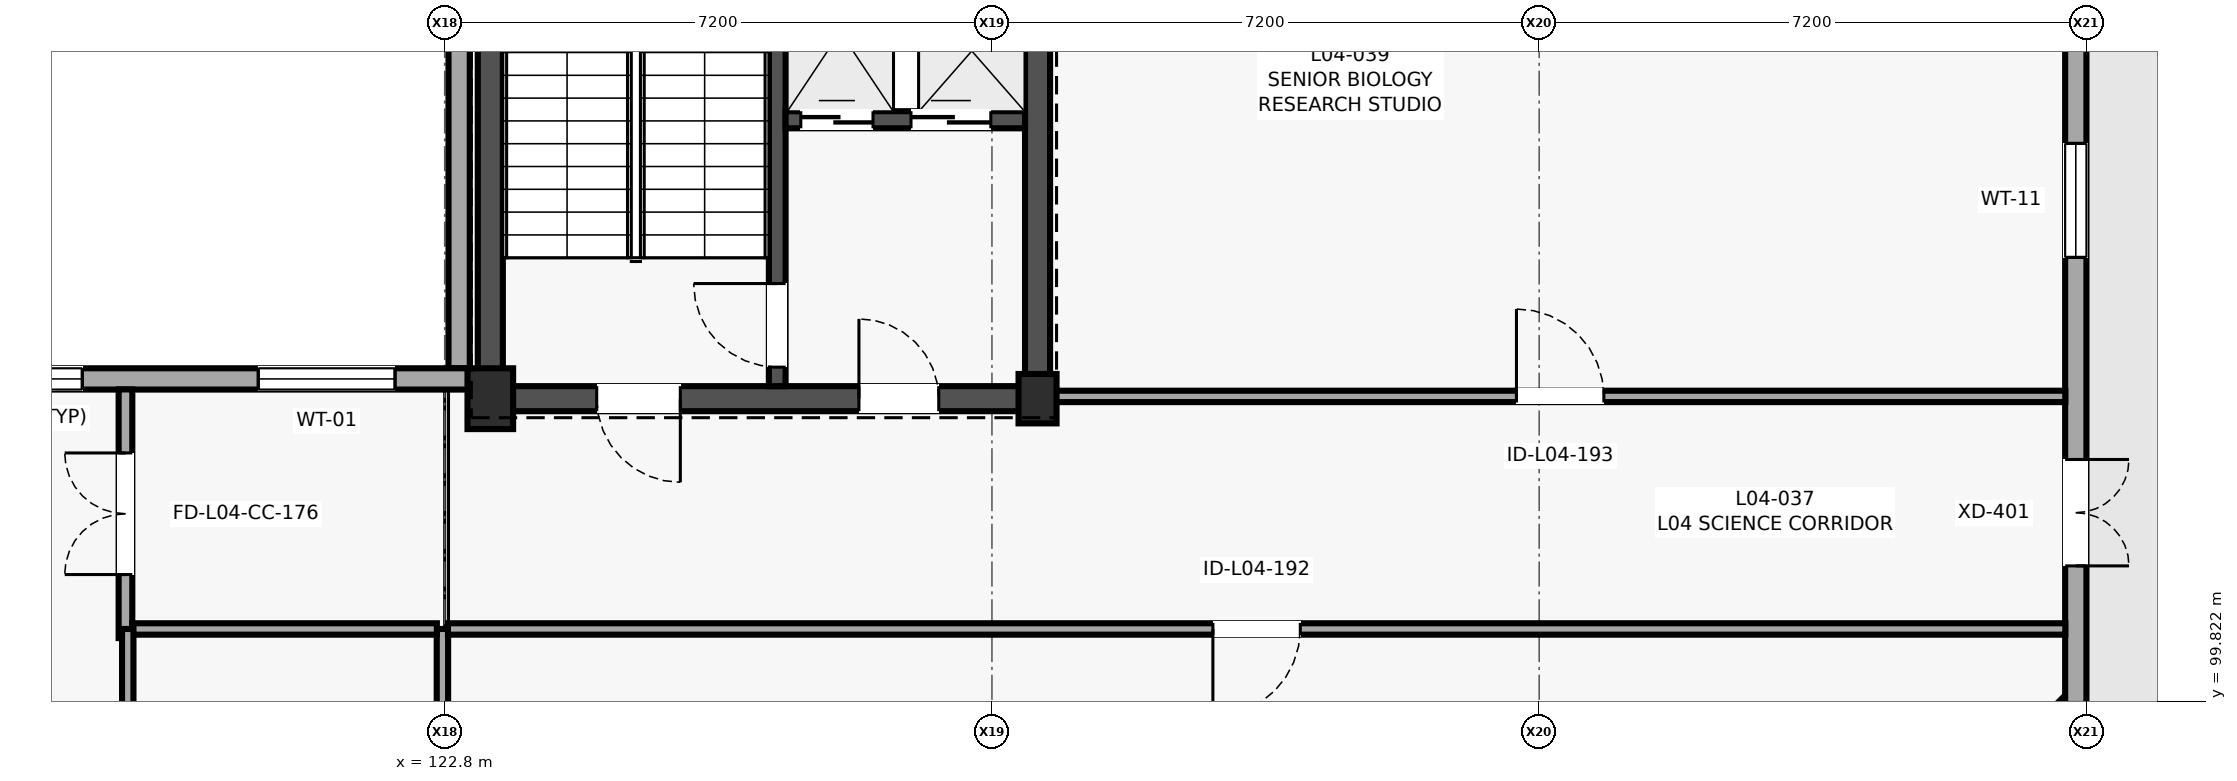
"""IFC4 building model, lengths in metres.
Left out: names, types, materials, properties, quantities, classifications, styles, units other than length and angle.
Written with IfcOpenShell. Run it as: python <this file> out.ifc"""

import sys

from ifc_helpers import new_model, si_unit, direction, frame, frame_2d, origin, origin_2d, place, context, subcontext, project, spatial, rectangle, extrude, element, fill, save


model = new_model("IFC4")
c1 = context("Model", 3, precision=1e-05, world=origin(), true_north=direction((0.0, 1.0)))
c2 = subcontext(c1, "Body", "Model", "MODEL_VIEW")
j1 = project(units=[si_unit("LENGTHUNIT", "METRE"), si_unit("PLANEANGLEUNIT", "RADIAN")], contexts=[c1])
p1 = place(None, origin())
s1 = spatial("IfcSite", under=j1, at=p1, CompositionType="ELEMENT")
p2 = place(p1, origin())
s2 = spatial("IfcBuilding", under=s1, at=p2, CompositionType="ELEMENT")
p3 = place(p2, frame((0.0, 0.0, 16.2)))
s3 = spatial("IfcBuildingStorey", under=s2, at=p3, CompositionType="ELEMENT", Elevation=16.2)
p4 = place(p3, frame((123.4, 103.8, 0.0), z_axis=(0.0, 0.0, 1.0), x_axis=(1.0, 0.0, 0.0)))
e1 = element("IfcColumn", 1, at=p4, inside=s3, PredefinedType="COLUMN", context=c2, shape_type="SweptSolid", body=[
    extrude(rectangle(XDim=0.6, YDim=0.8, at=origin_2d()), origin(), (0.0, 0.0, 1.0), 4.0),
])
p5 = place(p3, frame((130.6, 103.8, 0.0), z_axis=(0.0, 0.0, 1.0), x_axis=(1.0, 0.0, 0.0)))
e2 = element("IfcColumn", 2, at=p5, inside=s3, PredefinedType="COLUMN", context=c2, shape_type="SweptSolid", body=[
    extrude(rectangle(XDim=0.5, YDim=0.65, at=origin_2d()), origin(), (0.0, 0.0, 1.0), 4.0),
])
p6 = place(p3, frame((141.005, 96.584, 0.0), z_axis=(0.0, 0.0, 1.0), x_axis=(0.707133661755, 0.707079899597, 0.0)))
e3 = element("IfcWall", 3, at=p6, inside=s3, PredefinedType="SOLIDWALL", context=c2, shape_type="SweptSolid", body=[
    extrude(rectangle(XDim=4.541, YDim=0.28, at=frame_2d((2.271, 0.0))), origin(), (0.0, 0.0, 1.0), 3.78),
])
p7 = place(p3, frame((144.26, 99.783, 0.0), z_axis=(0.0, 0.0, 1.0), x_axis=(0.0, 1.0, 0.0)))
e4 = element("IfcWall", 4, at=p7, inside=s3, PredefinedType="SOLIDWALL", context=c2, shape_type="SweptSolid", body=[
    extrude(rectangle(XDim=8.834, YDim=0.28, at=frame_2d((4.417, 0.0))), origin(), (0.0, 0.0, 1.0), 3.78),
])
p8 = place(p7, frame((1.817, 0.0, 0.0)))
e5 = element("IfcOpeningElement", 5, at=p8, cuts=e4, PredefinedType="OPENING", context=c2, shape_type="SweptSolid", body=[
    extrude(rectangle(XDim=1.4, YDim=2.15, at=frame_2d((0.7, 1.075))), frame((0.0, 0.15, 0.0), z_axis=(0.0, -1.0, 0.0), x_axis=(1.0, 0.0, 0.0)), (0.0, 0.0, 1.0), 0.3),
])
p9 = place(p7, frame((5.876, 0.0, 0.75)))
e6 = element("IfcOpeningElement", 6, at=p9, cuts=e4, PredefinedType="OPENING", context=c2, shape_type="SweptSolid", body=[
    extrude(rectangle(XDim=1.5, YDim=2.2, at=frame_2d((0.75, 1.1))), frame((0.0, 0.15, 0.0), z_axis=(0.0, -1.0, 0.0), x_axis=(1.0, 0.0, 0.0)), (0.0, 0.0, 1.0), 0.3),
])
p10 = place(p3, frame((122.99, 111.72, 0.0), z_axis=(0.0, 0.0, 1.0), x_axis=(0.0, -1.0, 0.0)))
e7 = element("IfcWall", 7, at=p10, inside=s3, PredefinedType="SOLIDWALL", context=c2, shape_type="SweptSolid", body=[
    extrude(rectangle(XDim=7.52, YDim=0.28, at=frame_2d((3.76, 0.0))), origin(), (0.0, 0.0, 1.0), 3.78),
])
p11 = place(p3, frame((123.13, 104.06, 0.0), z_axis=(0.0, 0.0, 1.0), x_axis=(-1.0, 0.0, 0.0)))
e8 = element("IfcWall", 8, at=p11, inside=s3, PredefinedType="SOLIDWALL", context=c2, shape_type="SweptSolid", body=[
    extrude(rectangle(XDim=7.53, YDim=0.28, at=frame_2d((3.765, 0.0))), origin(), (0.0, 0.0, 1.0), 3.78),
])
p12 = place(p11, frame((0.983, 0.0, 0.85)))
e9 = element("IfcOpeningElement", 9, at=p12, cuts=e8, PredefinedType="OPENING", context=c2, shape_type="SweptSolid", body=[
    extrude(rectangle(XDim=1.8, YDim=1.8, at=frame_2d((0.9, 0.9))), frame((0.0, 0.15, 0.0), z_axis=(0.0, -1.0, 0.0), x_axis=(1.0, 0.0, 0.0)), (0.0, 0.0, 1.0), 0.3),
])
p13 = place(p11, frame((5.098, 0.0, 0.75)))
e10 = element("IfcOpeningElement", 10, at=p13, cuts=e8, PredefinedType="OPENING", context=c2, shape_type="SweptSolid", body=[
    extrude(rectangle(XDim=1.1, YDim=2.1, at=frame_2d((0.55, 1.05))), frame((0.0, 0.15, 0.0), z_axis=(0.0, -1.0, 0.0), x_axis=(1.0, 0.0, 0.0)), (0.0, 0.0, 1.0), 0.3),
])
p14 = place(p3, frame((123.235, 103.8, 0.0), z_axis=(0.0, 0.0, 1.0), x_axis=(1.0, 0.0, 0.0)))
e11 = element("IfcWall", 11, at=p14, inside=s3, PredefinedType="SHEAR", context=c2, shape_type="SweptSolid", body=[
    extrude(rectangle(XDim=7.53, YDim=0.33, at=frame_2d((3.765, 0.0))), origin(), (0.0, 0.0, 1.0), 3.78),
])
p15 = place(p14, frame((5.015, 0.0, 0.0)))
e12 = element("IfcOpeningElement", 12, at=p15, cuts=e11, PredefinedType="OPENING", context=c2, shape_type="SweptSolid", body=[
    extrude(rectangle(XDim=1.05, YDim=2.15, at=frame_2d((0.525, 1.075))), frame((0.0, 0.175, 0.0), z_axis=(0.0, -1.0, 0.0), x_axis=(1.0, 0.0, 0.0)), (0.0, 0.0, 1.0), 0.35),
])
p16 = place(p14, frame((1.565, 0.0, 0.0)))
e13 = element("IfcOpeningElement", 13, at=p16, cuts=e11, PredefinedType="OPENING", context=c2, shape_type="SweptSolid", body=[
    extrude(rectangle(XDim=1.1, YDim=2.15, at=frame_2d((0.55, 1.075))), frame((0.0, 0.175, 0.0), z_axis=(0.0, -1.0, 0.0), x_axis=(1.0, 0.0, 0.0)), (0.0, 0.0, 1.0), 0.35),
])
for number, where, z_axis, x_axis in (
    (14, (123.4, 103.965, 0.0), (0.0, 0.0, 1.0), (0.0, 1.0, 0.0)),
    (15, (130.6, 103.965, 0.0), (0.0, 0.0, 1.0), (0.0, 1.0, 0.0)),
):
    element("IfcWall", number, at=place(p3, frame(where, z_axis=z_axis, x_axis=x_axis)), inside=s3, PredefinedType="SHEAR", context=c2, shape_type="SweptSolid", body=[
        extrude(rectangle(XDim=7.47, YDim=0.33, at=frame_2d((3.735, 0.0))), origin(), (0.0, 0.0, 1.0), 3.78),
    ])
p17 = place(p3, frame((127.175, 103.965, 0.0), z_axis=(0.0, 0.0, 1.0), x_axis=(0.0, 1.0, 0.0)))
e16 = element("IfcWall", 16, at=p17, inside=s3, PredefinedType="SHEAR", context=c2, shape_type="SweptSolid", body=[
    extrude(rectangle(XDim=7.47, YDim=0.22, at=frame_2d((3.735, 0.0))), origin(), (0.0, 0.0, 1.0), 3.78),
])
p18 = place(p17, frame((0.25, 0.0, 0.0)))
e17 = element("IfcOpeningElement", 17, at=p18, cuts=e16, PredefinedType="OPENING", context=c2, shape_type="SweptSolid", body=[
    extrude(rectangle(XDim=1.1, YDim=2.15, at=frame_2d((0.55, 1.075))), frame((0.0, 0.12, 0.0), z_axis=(0.0, -1.0, 0.0), x_axis=(1.0, 0.0, 0.0)), (0.0, 0.0, 1.0), 0.24),
])
p19 = place(p3, frame((127.285, 107.47, 0.0), z_axis=(0.0, 0.0, 1.0), x_axis=(1.0, 0.0, 0.0)))
e18 = element("IfcWall", 18, at=p19, inside=s3, PredefinedType="SHEAR", context=c2, shape_type="SweptSolid", body=[
    extrude(rectangle(XDim=3.15, YDim=0.225, at=frame_2d((1.575, 0.0))), origin(), (0.0, 0.0, 1.0), 3.78),
])
p20 = place(p19, frame((0.2, 0.0, 0.0)))
e19 = element("IfcOpeningElement", 19, at=p20, cuts=e18, PredefinedType="OPENING", context=c2, shape_type="SweptSolid", body=[
    extrude(rectangle(XDim=0.95, YDim=2.15, at=frame_2d((0.475, 1.075))), frame((0.0, 0.123, 0.0), z_axis=(0.0, -1.0, 0.0), x_axis=(1.0, 0.0, 0.0)), (0.0, 0.0, 1.0), 0.245),
])
p21 = place(p19, frame((1.65, 0.0, 0.0)))
e20 = element("IfcOpeningElement", 20, at=p21, cuts=e18, PredefinedType="OPENING", context=c2, shape_type="SweptSolid", body=[
    extrude(rectangle(XDim=1.05, YDim=2.2, at=frame_2d((0.525, 1.1))), frame((0.0, 0.123, 0.0), z_axis=(0.0, -1.0, 0.0), x_axis=(1.0, 0.0, 0.0)), (0.0, 0.0, 1.0), 0.245),
])
p22 = place(p3, frame((118.6, 100.65, 0.0), z_axis=(0.0, 0.0, 1.0), x_axis=(0.0, 1.0, 0.0)))
e21 = element("IfcWall", 21, at=p22, inside=s3, PredefinedType="PARTITIONING", context=c2, shape_type="SweptSolid", body=[
    extrude(rectangle(XDim=3.272, YDim=0.18, at=frame_2d((1.636, 0.0))), origin(), (0.0, 0.0, 1.0), 3.78),
])
p23 = place(p22, frame((0.836, 0.0, 0.0)))
e22 = element("IfcOpeningElement", 22, at=p23, cuts=e21, PredefinedType="OPENING", context=c2, shape_type="SweptSolid", body=[
    extrude(rectangle(XDim=1.6, YDim=2.25, at=frame_2d((0.8, 1.125))), frame((0.0, 0.1, 0.0), z_axis=(0.0, -1.0, 0.0), x_axis=(1.0, 0.0, 0.0)), (0.0, 0.0, 1.0), 0.2),
])
p24 = place(p3, frame((122.77, 96.678, 0.0), z_axis=(0.0, 0.0, 1.0), x_axis=(0.0, 1.0, 0.0)))
e23 = element("IfcWall", 23, at=p24, inside=s3, PredefinedType="PARTITIONING", context=c2, shape_type="SweptSolid", body=[
    extrude(rectangle(XDim=4.092, YDim=0.15, at=frame_2d((2.046, 0.0))), origin(), (0.0, 0.0, 1.0), 3.775),
])
p25 = place(p3, frame((122.697, 100.77, 0.0), z_axis=(0.0, 0.0, 1.0), x_axis=(-1.0, 0.0, 0.0)))
e24 = element("IfcWall", 24, at=p25, inside=s3, PredefinedType="PARTITIONING", context=c2, shape_type="SweptSolid", body=[
    extrude(rectangle(XDim=4.009, YDim=0.15, at=frame_2d((2.004, 0.0))), origin(), (0.0, 0.0, 1.0), 3.775),
])
p26 = place(p3, frame((118.63, 100.77, 0.0), z_axis=(0.0, 0.0, 1.0), x_axis=(0.0, -1.0, 0.0)))
e25 = element("IfcWall", 25, at=p26, inside=s3, PredefinedType="PARTITIONING", context=c2, shape_type="SweptSolid", body=[
    extrude(rectangle(XDim=10.922, YDim=0.15, at=frame_2d((5.461, 0.0))), origin(), (0.0, 0.0, 1.0), 3.225),
])
p27 = place(p26, frame((4.886, 0.0, 0.0)))
e26 = element("IfcOpeningElement", 26, at=p27, cuts=e25, PredefinedType="OPENING", context=c2, shape_type="SweptSolid", body=[
    extrude(rectangle(XDim=1.15, YDim=2.2, at=frame_2d((0.575, 1.1))), frame((0.0, 0.085, 0.0), z_axis=(0.0, -1.0, 0.0), x_axis=(1.0, 0.0, 0.0)), (0.0, 0.0, 1.0), 0.17),
])
p28 = place(p3, frame((144.122, 100.77, 0.0), z_axis=(0.0, 0.0, 1.0), x_axis=(-1.0, 0.0, 0.0)))
e27 = element("IfcWall", 27, at=p28, inside=s3, PredefinedType="PARTITIONING", context=c2, shape_type="SweptSolid", body=[
    extrude(rectangle(XDim=21.279, YDim=0.15, at=frame_2d((10.64, 0.0))), origin(), (0.0, 0.0, 1.0), 3.76),
])
p29 = place(p28, frame((10.065, 0.0, 0.0)))
e28 = element("IfcOpeningElement", 28, at=p29, cuts=e27, PredefinedType="OPENING", context=c2, shape_type="SweptSolid", body=[
    extrude(rectangle(XDim=1.15, YDim=2.2, at=frame_2d((0.575, 1.1))), frame((0.0, 0.085, 0.0), z_axis=(0.0, -1.0, 0.0), x_axis=(1.0, 0.0, 0.0)), (0.0, 0.0, 1.0), 0.17),
])
p30 = place(p3, frame((130.83, 103.83, 0.0), z_axis=(0.0, 0.0, 1.0), x_axis=(1.0, 0.0, 0.0)))
e29 = element("IfcWall", 29, at=p30, inside=s3, PredefinedType="PARTITIONING", context=c2, shape_type="SweptSolid", body=[
    extrude(rectangle(XDim=13.292, YDim=0.15, at=frame_2d((6.646, 0.0))), origin(), (0.0, 0.0, 1.0), 3.76),
])
p31 = place(p30, frame((6.071, 0.0, 0.0)))
e30 = element("IfcOpeningElement", 30, at=p31, cuts=e29, PredefinedType="OPENING", context=c2, shape_type="SweptSolid", body=[
    extrude(rectangle(XDim=1.15, YDim=2.2, at=frame_2d((0.575, 1.1))), frame((0.0, 0.085, 0.0), z_axis=(0.0, -1.0, 0.0), x_axis=(1.0, 0.0, 0.0)), (0.0, 0.0, 1.0), 0.17),
])
p32 = place(p8, frame((1.4, 0.0, 0.0), z_axis=(0.0, 0.0, 1.0), x_axis=(-1.0, 0.0, 0.0)))
e31 = element("IfcDoor", 31, at=p32, inside=s3, OperationType="DOUBLE_DOOR_SINGLE_SWING", PredefinedType="DOOR", context=c2, shape_type="SweptSolid", body=[
    extrude(rectangle(XDim=1.4, YDim=2.15, at=frame_2d((0.7, 1.075))), frame((0.0, 0.025, 0.0), z_axis=(0.0, -1.0, 0.0), x_axis=(1.0, 0.0, 0.0)), (0.0, 0.0, 1.0), 0.05),
])
fill(e5, e31)
p33 = place(p9, origin())
e32 = element("IfcWindow", 32, at=p33, inside=s3, PartitioningType="SINGLE_PANEL", PredefinedType="WINDOW", context=c2, shape_type="SweptSolid", body=[
    extrude(rectangle(XDim=1.5, YDim=2.2, at=frame_2d((0.75, 1.1))), frame((0.0, 0.03, 0.0), z_axis=(0.0, -1.0, 0.0), x_axis=(1.0, 0.0, 0.0)), (0.0, 0.0, 1.0), 0.06),
])
fill(e6, e32)
p34 = place(p12, origin())
e33 = element("IfcWindow", 33, at=p34, inside=s3, PartitioningType="SINGLE_PANEL", PredefinedType="WINDOW", context=c2, shape_type="SweptSolid", body=[
    extrude(rectangle(XDim=1.8, YDim=1.8, at=frame_2d((0.9, 0.9))), frame((0.0, 0.03, 0.0), z_axis=(0.0, -1.0, 0.0), x_axis=(1.0, 0.0, 0.0)), (0.0, 0.0, 1.0), 0.06),
])
fill(e9, e33)
p35 = place(p13, origin())
e34 = element("IfcWindow", 34, at=p35, inside=s3, PartitioningType="SINGLE_PANEL", PredefinedType="WINDOW", context=c2, shape_type="SweptSolid", body=[
    extrude(rectangle(XDim=1.1, YDim=2.1, at=frame_2d((0.55, 1.05))), frame((0.0, 0.03, 0.0), z_axis=(0.0, -1.0, 0.0), x_axis=(1.0, 0.0, 0.0)), (0.0, 0.0, 1.0), 0.06),
])
fill(e10, e34)
p36 = place(p20, origin())
e35 = element("IfcDoor", 35, at=p36, inside=s3, OperationType="SLIDING_TO_LEFT", PredefinedType="DOOR", context=c2, shape_type="SweptSolid", body=[
    extrude(rectangle(XDim=0.95, YDim=2.15, at=frame_2d((0.475, 1.075))), frame((0.0, 0.025, 0.0), z_axis=(0.0, -1.0, 0.0), x_axis=(1.0, 0.0, 0.0)), (0.0, 0.0, 1.0), 0.05),
])
fill(e19, e35)
p37 = place(p21, origin())
e36 = element("IfcDoor", 36, at=p37, inside=s3, OperationType="SLIDING_TO_RIGHT", PredefinedType="DOOR", context=c2, shape_type="SweptSolid", body=[
    extrude(rectangle(XDim=1.05, YDim=2.2, at=frame_2d((0.525, 1.1))), frame((0.0, 0.025, 0.0), z_axis=(0.0, -1.0, 0.0), x_axis=(1.0, 0.0, 0.0)), (0.0, 0.0, 1.0), 0.05),
])
fill(e20, e36)
p38 = place(p18, origin())
e37 = element("IfcDoor", 37, at=p38, inside=s3, OperationType="SINGLE_SWING_RIGHT", PredefinedType="DOOR", context=c2, shape_type="SweptSolid", body=[
    extrude(rectangle(XDim=1.1, YDim=2.15, at=frame_2d((0.55, 1.075))), frame((0.0, 0.025, 0.0), z_axis=(0.0, -1.0, 0.0), x_axis=(1.0, 0.0, 0.0)), (0.0, 0.0, 1.0), 0.05),
])
fill(e17, e37)
p39 = place(p15, origin())
e38 = element("IfcDoor", 38, at=p39, inside=s3, OperationType="SINGLE_SWING_LEFT", PredefinedType="DOOR", context=c2, shape_type="SweptSolid", body=[
    extrude(rectangle(XDim=1.05, YDim=2.15, at=frame_2d((0.525, 1.075))), frame((0.0, 0.025, 0.0), z_axis=(0.0, -1.0, 0.0), x_axis=(1.0, 0.0, 0.0)), (0.0, 0.0, 1.0), 0.05),
])
fill(e12, e38)
p40 = place(p16, frame((1.1, 0.0, 0.0), z_axis=(0.0, 0.0, 1.0), x_axis=(-1.0, 0.0, 0.0)))
e39 = element("IfcDoor", 39, at=p40, inside=s3, OperationType="SINGLE_SWING_RIGHT", PredefinedType="DOOR", context=c2, shape_type="SweptSolid", body=[
    extrude(rectangle(XDim=1.1, YDim=2.15, at=frame_2d((0.55, 1.075))), frame((0.0, 0.025, 0.0), z_axis=(0.0, -1.0, 0.0), x_axis=(1.0, 0.0, 0.0)), (0.0, 0.0, 1.0), 0.05),
])
fill(e13, e39)
p41 = place(p23, origin())
e40 = element("IfcDoor", 40, at=p41, inside=s3, OperationType="DOUBLE_DOOR_SINGLE_SWING", PredefinedType="DOOR", context=c2, shape_type="SweptSolid", body=[
    extrude(rectangle(XDim=1.6, YDim=2.25, at=frame_2d((0.8, 1.125))), frame((0.0, 0.025, 0.0), z_axis=(0.0, -1.0, 0.0), x_axis=(1.0, 0.0, 0.0)), (0.0, 0.0, 1.0), 0.05),
])
fill(e22, e40)
p42 = place(p29, origin())
e41 = element("IfcDoor", 41, at=p42, inside=s3, OperationType="SINGLE_SWING_RIGHT", PredefinedType="DOOR", context=c2, shape_type="SweptSolid", body=[
    extrude(rectangle(XDim=1.15, YDim=2.2, at=frame_2d((0.575, 1.1))), frame((0.0, 0.025, 0.0), z_axis=(0.0, -1.0, 0.0), x_axis=(1.0, 0.0, 0.0)), (0.0, 0.0, 1.0), 0.05),
])
fill(e28, e41)
p43 = place(p31, origin())
e42 = element("IfcDoor", 42, at=p43, inside=s3, OperationType="SINGLE_SWING_LEFT", PredefinedType="DOOR", context=c2, shape_type="SweptSolid", body=[
    extrude(rectangle(XDim=1.15, YDim=2.2, at=frame_2d((0.575, 1.1))), frame((0.0, 0.025, 0.0), z_axis=(0.0, -1.0, 0.0), x_axis=(1.0, 0.0, 0.0)), (0.0, 0.0, 1.0), 0.05),
])
fill(e30, e42)
save(model, sys.argv[1])
